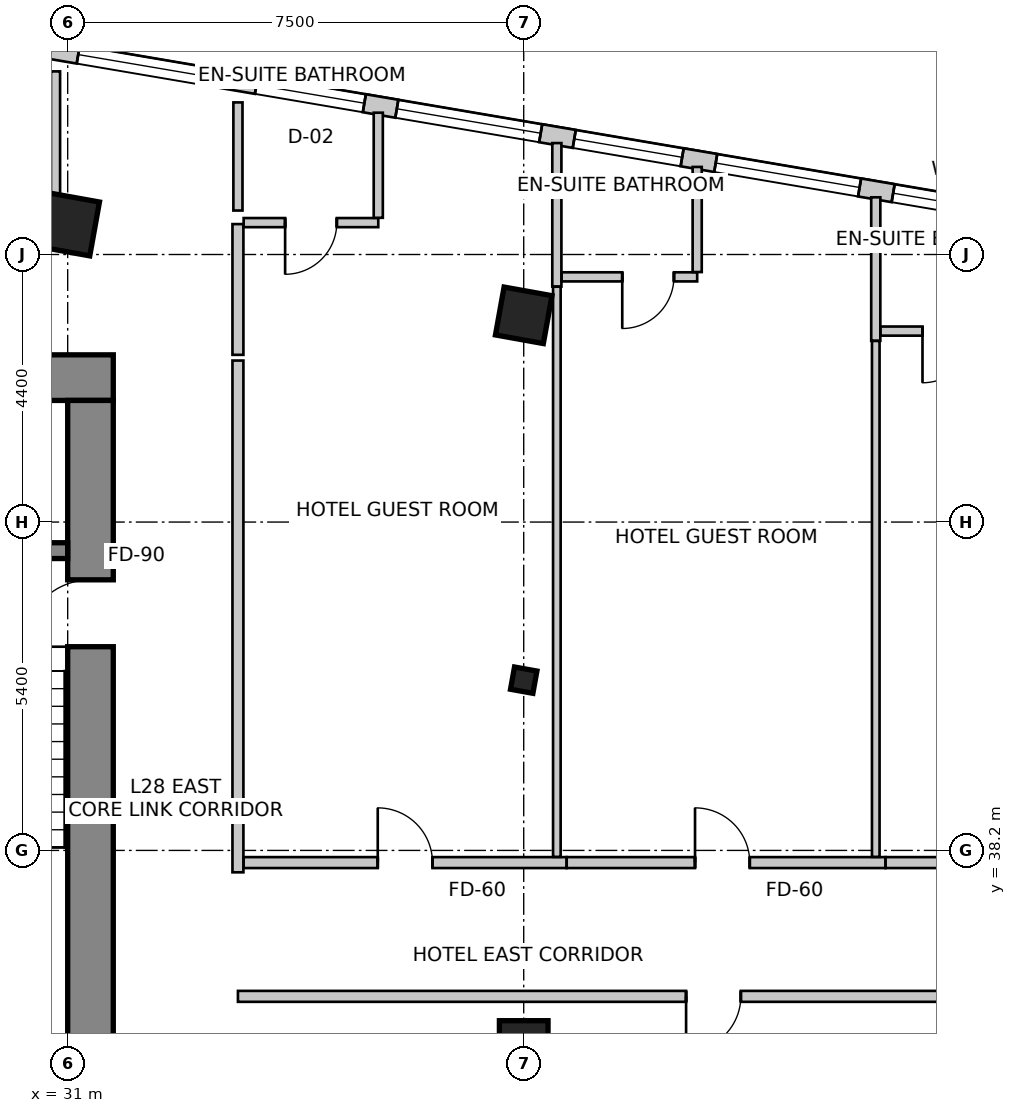
"""IFC4 building model, lengths in metres.
Left out: names, types, materials, properties, quantities, classifications, styles, units other than length and angle.
Written with IfcOpenShell. Run it as: python <this file> out.ifc"""

import sys

from ifc_helpers import new_model, si_unit, direction, frame, frame_2d, origin, origin_2d, place, context, subcontext, project, spatial, rectangle, i_section, extrude, source, transform, mapped, element, fill, save


model = new_model("IFC4")
c1 = context("Model", 3, precision=1e-05, world=origin(), true_north=direction((0.0, 1.0)))
c2 = subcontext(c1, "Body", "Model", "MODEL_VIEW")
j1 = project(units=[si_unit("LENGTHUNIT", "METRE"), si_unit("PLANEANGLEUNIT", "RADIAN")], contexts=[c1])
p1 = place(None, origin())
s1 = spatial("IfcSite", under=j1, at=p1, CompositionType="ELEMENT")
p2 = place(p1, origin())
s2 = spatial("IfcBuilding", under=s1, at=p2, CompositionType="ELEMENT")
p3 = place(p2, frame((0.0, 0.0, 117.8)))
s3 = spatial("IfcBuildingStorey", under=s2, at=p3, CompositionType="ELEMENT", Elevation=117.8)
p4 = place(p3, frame((15.85, 45.975, 0.0), z_axis=(0.0, 0.0, 1.0), x_axis=(1.0, 0.0, 0.0)))
e1 = element("IfcWall", 1, at=p4, inside=s3, PredefinedType="SHEAR", context=c2, shape_type="SweptSolid", body=[
    extrude(rectangle(XDim=15.9, YDim=0.75, at=frame_2d((7.95, 0.0))), origin(), (0.0, 0.0, 1.0), 3.6),
])
p5 = place(p3, frame((31.375, 34.2, 0.0), z_axis=(0.0, 0.0, 1.0), x_axis=(0.0, 1.0, 0.0)))
e2 = element("IfcWall", 2, at=p5, inside=s3, PredefinedType="SHEAR", context=c2, shape_type="SweptSolid", body=[
    extrude(rectangle(XDim=11.4, YDim=0.75, at=frame_2d((5.7, 0.0))), origin(), (0.0, 0.0, 1.0), 3.6),
])
m1 = source(origin(), c2, "Body", "SweptSolid", [
    extrude(rectangle(XDim=1.1, YDim=2.15, at=frame_2d((0.55, 1.075))), frame((0.0, 0.385, 0.0), z_axis=(0.0, -1.0, 0.0), x_axis=(1.0, 0.0, 0.0)), (0.0, 0.0, 1.0), 0.77),
])
p6 = place(p5, frame((7.35, 0.0, 0.0)))
e3 = element("IfcOpeningElement", 3, at=p6, cuts=e2, PredefinedType="OPENING", context=c2, shape_type="MappedRepresentation", body=[
    mapped(m1, transform((0.0, 0.0, 0.0), scale=1.0)),
])
p7 = place(p3, frame((27.5, 43.13, 0.0), z_axis=(0.0, 0.0, 1.0), x_axis=(1.0, 0.0, 0.0)))
e4 = element("IfcWall", 4, at=p7, inside=s3, PredefinedType="SHEAR", context=c2, shape_type="SweptSolid", body=[
    extrude(rectangle(XDim=3.5, YDim=0.26, at=frame_2d((1.75, 0.0))), origin(), (0.0, 0.0, 1.0), 3.6),
])
m2 = source(origin(), c2, "Body", "SweptSolid", [
    extrude(rectangle(XDim=0.9, YDim=0.9, at=origin_2d()), origin(), (0.0, 0.0, 1.0), 3.6),
])
p8 = place(p3, frame((31.0, 48.5, 0.0), z_axis=(0.0, 0.0, 1.0), x_axis=(0.984195607969, -0.17708474032, 0.0)))
e5 = element("IfcColumn", 5, at=p8, inside=s3, PredefinedType="COLUMN", context=c2, shape_type="MappedRepresentation", body=[
    mapped(m2, transform((0.0, 0.0, 0.0), scale=1.0)),
])
m3 = source(origin(), c2, "Body", "SweptSolid", [
    extrude(rectangle(XDim=0.8, YDim=0.8, at=origin_2d()), origin(), (0.0, 0.0, 1.0), 3.6),
])
for number, where, z_axis, x_axis in (
    (6, (38.5, 47.0, 0.0), (0.0, 0.0, 1.0), (0.984, -0.177, 0.0)),
    (7, (38.5, 35.0, 0.0), (0.0, 0.0, 1.0), (1.0, 0.0, 0.0)),
):
    element("IfcColumn", number, at=place(p3, frame(where, z_axis=z_axis, x_axis=x_axis)), inside=s3, PredefinedType="COLUMN", context=c2, shape_type="MappedRepresentation", body=[
        mapped(m3, transform((0.0, 0.0, 0.0), scale=1.0)),
    ])
m4 = source(origin(), c2, "Body", "SweptSolid", [
    extrude(i_section(OverallWidth=0.374, OverallDepth=0.372, WebThickness=0.016, FlangeThickness=0.026, FilletRadius=0.015, at=origin_2d()), origin(), (0.0, 0.0, 1.0), 3.6),
])
p9 = place(p3, frame((38.5, 41.0, 0.0), z_axis=(0.0, 0.0, 1.0), x_axis=(0.984195607969, -0.17708474032, 0.0)))
e8 = element("IfcColumn", 8, at=p9, inside=s3, PredefinedType="COLUMN", context=c2, shape_type="MappedRepresentation", body=[
    mapped(m4, transform((0.0, 0.0, 0.0), scale=1.0)),
])
p10 = place(p3, frame((53.561, 47.48, 0.0), z_axis=(0.0, 0.0, 1.0), x_axis=(-0.985845173895, 0.167658262868, 0.0)))
e9 = element("IfcWall", 9, at=p10, inside=s3, PredefinedType="SOLIDWALL", context=c2, shape_type="SweptSolid", body=[
    extrude(rectangle(XDim=32.132, YDim=0.3, at=frame_2d((16.066, 0.0))), origin(), (0.0, 0.0, 1.0), 3.35),
])
m5 = source(origin(), c2, "Body", "SweptSolid", [
    extrude(rectangle(XDim=2.4, YDim=2.2, at=frame_2d((1.2, 1.1))), frame((0.0, 0.16, 0.0), z_axis=(0.0, -1.0, 0.0), x_axis=(1.0, 0.0, 0.0)), (0.0, 0.0, 1.0), 0.32),
])
p11 = place(p10, frame((0.882, 0.0, 0.85)))
e10 = element("IfcOpeningElement", 10, at=p11, cuts=e9, PredefinedType="OPENING", context=c2, shape_type="MappedRepresentation", body=[
    mapped(m5, transform((0.0, 0.0, 0.0), scale=1.0)),
])
p12 = place(p10, frame((4.354, 0.0, 0.85)))
e11 = element("IfcOpeningElement", 11, at=p12, cuts=e9, PredefinedType="OPENING", context=c2, shape_type="MappedRepresentation", body=[
    mapped(m5, transform((0.0, 0.0, 0.0), scale=1.0)),
])
m6 = source(origin(), c2, "Body", "SweptSolid", [
    extrude(rectangle(XDim=1.8, YDim=2.1, at=frame_2d((0.9, 1.05))), frame((0.0, 0.16, 0.0), z_axis=(0.0, -1.0, 0.0), x_axis=(1.0, 0.0, 0.0)), (0.0, 0.0, 1.0), 0.32),
])
p13 = place(p10, frame((7.314, 0.0, 0.85)))
e12 = element("IfcOpeningElement", 12, at=p13, cuts=e9, PredefinedType="OPENING", context=c2, shape_type="MappedRepresentation", body=[
    mapped(m6, transform((0.0, 0.0, 0.0), scale=1.0)),
])
p14 = place(p10, frame((9.674, 0.0, 0.85)))
e13 = element("IfcOpeningElement", 13, at=p14, cuts=e9, PredefinedType="OPENING", context=c2, shape_type="MappedRepresentation", body=[
    mapped(m5, transform((0.0, 0.0, 0.0), scale=1.0)),
])
p15 = place(p10, frame((12.634, 0.0, 0.85)))
e14 = element("IfcOpeningElement", 14, at=p15, cuts=e9, PredefinedType="OPENING", context=c2, shape_type="MappedRepresentation", body=[
    mapped(m6, transform((0.0, 0.0, 0.0), scale=1.0)),
])
p16 = place(p10, frame((14.994, 0.0, 0.85)))
e15 = element("IfcOpeningElement", 15, at=p16, cuts=e9, PredefinedType="OPENING", context=c2, shape_type="MappedRepresentation", body=[
    mapped(m5, transform((0.0, 0.0, 0.0), scale=1.0)),
])
p17 = place(p10, frame((17.936, 0.0, 0.85)))
e16 = element("IfcOpeningElement", 16, at=p17, cuts=e9, PredefinedType="OPENING", context=c2, shape_type="MappedRepresentation", body=[
    mapped(m6, transform((0.0, 0.0, 0.0), scale=1.0)),
])
p18 = place(p10, frame((20.309, 0.0, 0.85)))
e17 = element("IfcOpeningElement", 17, at=p18, cuts=e9, PredefinedType="OPENING", context=c2, shape_type="MappedRepresentation", body=[
    mapped(m5, transform((0.0, 0.0, 0.0), scale=1.0)),
])
p19 = place(p10, frame((25.4, 0.0, 0.85)))
e18 = element("IfcOpeningElement", 18, at=p19, cuts=e9, PredefinedType="OPENING", context=c2, shape_type="MappedRepresentation", body=[
    mapped(m5, transform((0.0, 0.0, 0.0), scale=1.0)),
])
m7 = source(origin(), c2, "Body", "SweptSolid", [
    extrude(rectangle(XDim=1.2, YDim=1.6, at=frame_2d((0.6, 0.8))), frame((0.0, 0.16, 0.0), z_axis=(0.0, -1.0, 0.0), x_axis=(1.0, 0.0, 0.0)), (0.0, 0.0, 1.0), 0.32),
])
p20 = place(p10, frame((30.5, 0.0, 0.85)))
e19 = element("IfcOpeningElement", 19, at=p20, cuts=e9, PredefinedType="OPENING", context=c2, shape_type="MappedRepresentation", body=[
    mapped(m7, transform((0.0, 0.0, 0.0), scale=1.0)),
])
p21 = place(p3, frame((23.962, 48.5, 0.0), z_axis=(0.0, 0.0, 1.0), x_axis=(1.0, 0.0, 0.0)))
e20 = element("IfcWall", 20, at=p21, inside=s3, PredefinedType="PARTITIONING", context=c2, shape_type="SweptSolid", body=[
    extrude(rectangle(XDim=6.998, YDim=0.18, at=frame_2d((3.499, 0.0))), origin(), (0.0, 0.0, 1.0), 2.492),
])
m8 = source(origin(), c2, "Body", "SweptSolid", [
    extrude(rectangle(XDim=0.85, YDim=2.15, at=frame_2d((0.425, 1.075))), frame((0.0, 0.1, 0.0), z_axis=(0.0, -1.0, 0.0), x_axis=(1.0, 0.0, 0.0)), (0.0, 0.0, 1.0), 0.2),
])
p22 = place(p21, frame((3.074, 0.0, 0.0)))
e21 = element("IfcOpeningElement", 21, at=p22, cuts=e20, PredefinedType="OPENING", context=c2, shape_type="MappedRepresentation", body=[
    mapped(m8, transform((0.0, 0.0, 0.0), scale=1.0)),
])
p23 = place(p3, frame((33.8, 48.5, 0.0), z_axis=(0.0, 0.0, 1.0), x_axis=(0.0, -1.0, 0.0)))
e22 = element("IfcWall", 22, at=p23, inside=s3, PredefinedType="PARTITIONING", context=c2, shape_type="SweptSolid", body=[
    extrude(rectangle(XDim=2.15, YDim=0.18, at=frame_2d((1.075, 0.0))), origin(), (0.0, 0.0, 1.0), 2.492),
])
p24 = place(p3, frame((33.8, 46.256, 0.0), z_axis=(0.0, 0.0, 1.0), x_axis=(0.0, -1.0, 0.0)))
e23 = element("IfcWall", 23, at=p24, inside=s3, PredefinedType="PARTITIONING", context=c2, shape_type="SweptSolid", body=[
    extrude(rectangle(XDim=8.416, YDim=0.18, at=frame_2d((4.208, 0.0))), origin(), (0.0, 0.0, 1.0), 2.879),
])
p25 = place(p3, frame((33.894, 38.0, 0.0), z_axis=(0.0, 0.0, 1.0), x_axis=(1.0, 0.0, 0.0)))
e24 = element("IfcWall", 24, at=p25, inside=s3, PredefinedType="PARTITIONING", context=c2, shape_type="SweptSolid", body=[
    extrude(rectangle(XDim=5.311, YDim=0.18, at=frame_2d((2.656, 0.0))), origin(), (0.0, 0.0, 1.0), 2.803),
])
m9 = source(origin(), c2, "Body", "SweptSolid", [
    extrude(rectangle(XDim=0.9, YDim=2.15, at=frame_2d((0.45, 1.075))), frame((0.0, 0.1, 0.0), z_axis=(0.0, -1.0, 0.0), x_axis=(1.0, 0.0, 0.0)), (0.0, 0.0, 1.0), 0.2),
])
p26 = place(p25, frame((2.206, 0.0, 0.0)))
e25 = element("IfcOpeningElement", 25, at=p26, cuts=e24, PredefinedType="OPENING", context=c2, shape_type="MappedRepresentation", body=[
    mapped(m9, transform((0.0, 0.0, 0.0), scale=1.0)),
])
p27 = place(p3, frame((39.207, 38.0, 0.0), z_axis=(0.0, 0.0, 1.0), x_axis=(1.0, 0.0, 0.0)))
e26 = element("IfcWall", 26, at=p27, inside=s3, PredefinedType="PARTITIONING", context=c2, shape_type="SweptSolid", body=[
    extrude(rectangle(XDim=5.243, YDim=0.18, at=frame_2d((2.622, 0.0))), origin(), (0.0, 0.0, 1.0), 2.879),
])
p28 = place(p27, frame((2.111, 0.0, 0.0)))
e27 = element("IfcOpeningElement", 27, at=p28, cuts=e26, PredefinedType="OPENING", context=c2, shape_type="MappedRepresentation", body=[
    mapped(m9, transform((0.0, 0.0, 0.0), scale=1.0)),
])
p29 = place(p3, frame((44.452, 38.0, 0.0), z_axis=(0.0, 0.0, 1.0), x_axis=(1.0, 0.0, 0.0)))
e28 = element("IfcWall", 28, at=p29, inside=s3, PredefinedType="PARTITIONING", context=c2, shape_type="SweptSolid", body=[
    extrude(rectangle(XDim=5.083, YDim=0.18, at=frame_2d((2.542, 0.0))), origin(), (0.0, 0.0, 1.0), 2.803),
])
p30 = place(p29, frame((2.092, 0.0, 0.0)))
e29 = element("IfcOpeningElement", 29, at=p30, cuts=e28, PredefinedType="OPENING", context=c2, shape_type="MappedRepresentation", body=[
    mapped(m9, transform((0.0, 0.0, 0.0), scale=1.0)),
])
p31 = place(p3, frame((49.441, 35.8, 0.0), z_axis=(0.0, 0.0, 1.0), x_axis=(-1.0, 0.0, 0.0)))
e30 = element("IfcWall", 30, at=p31, inside=s3, PredefinedType="PARTITIONING", context=c2, shape_type="SweptSolid", body=[
    extrude(rectangle(XDim=15.641, YDim=0.18, at=frame_2d((7.82, 0.0))), origin(), (0.0, 0.0, 1.0), 2.803),
])
p32 = place(p31, frame((7.371, 0.0, 0.0)))
e31 = element("IfcOpeningElement", 31, at=p32, cuts=e30, PredefinedType="OPENING", context=c2, shape_type="MappedRepresentation", body=[
    mapped(m9, transform((0.0, 0.0, 0.0), scale=1.0)),
])
p33 = place(p3, frame((36.108, 48.524, 0.0), z_axis=(0.0, 0.0, 1.0), x_axis=(-1.0, 0.0, 0.0)))
e32 = element("IfcWall", 32, at=p33, inside=s3, PredefinedType="PARTITIONING", context=c2, shape_type="SweptSolid", body=[
    extrude(rectangle(XDim=2.214, YDim=0.15, at=frame_2d((1.107, 0.0))), origin(), (0.0, 0.0, 1.0), 3.35),
])
m10 = source(origin(), c2, "Body", "SweptSolid", [
    extrude(rectangle(XDim=0.85, YDim=2.15, at=frame_2d((0.425, 1.075))), frame((0.0, 0.085, 0.0), z_axis=(0.0, -1.0, 0.0), x_axis=(1.0, 0.0, 0.0)), (0.0, 0.0, 1.0), 0.17),
])
p34 = place(p33, frame((0.682, 0.0, 0.0)))
e33 = element("IfcOpeningElement", 33, at=p34, cuts=e32, PredefinedType="OPENING", context=c2, shape_type="MappedRepresentation", body=[
    mapped(m10, transform((0.0, 0.0, 0.0), scale=1.0)),
])
p35 = place(p3, frame((36.108, 50.332, 0.0), z_axis=(0.0, 0.0, 1.0), x_axis=(0.0, -1.0, 0.0)))
e34 = element("IfcWall", 34, at=p35, inside=s3, PredefinedType="PARTITIONING", context=c2, shape_type="SweptSolid", body=[
    extrude(rectangle(XDim=1.728, YDim=0.15, at=frame_2d((0.864, 0.0))), origin(), (0.0, 0.0, 1.0), 3.35),
])
p36 = place(p3, frame((39.045, 49.833, 0.0), z_axis=(0.0, 0.0, 1.0), x_axis=(0.0, -1.0, 0.0)))
e35 = element("IfcWall", 35, at=p36, inside=s3, PredefinedType="PARTITIONING", context=c2, shape_type="SweptSolid", body=[
    extrude(rectangle(XDim=2.36, YDim=0.15, at=frame_2d((1.18, 0.0))), origin(), (0.0, 0.0, 1.0), 3.35),
])
p37 = place(p3, frame((39.045, 47.47, 0.0), z_axis=(0.0, 0.0, 1.0), x_axis=(0.0, -1.0, 0.0)))
e36 = element("IfcWall", 36, at=p37, inside=s3, PredefinedType="PARTITIONING", context=c2, shape_type="SweptSolid", body=[
    extrude(rectangle(XDim=9.376, YDim=0.125, at=frame_2d((4.688, 0.0))), origin(), (0.0, 0.0, 1.0), 2.492),
])
p38 = place(p3, frame((41.353, 47.633, 0.0), z_axis=(0.0, 0.0, 1.0), x_axis=(-1.0, 0.0, 0.0)))
e37 = element("IfcWall", 37, at=p38, inside=s3, PredefinedType="PARTITIONING", context=c2, shape_type="SweptSolid", body=[
    extrude(rectangle(XDim=2.229, YDim=0.15, at=frame_2d((1.115, 0.0))), origin(), (0.0, 0.0, 1.0), 3.35),
])
p39 = place(p38, frame((0.382, 0.0, 0.0)))
e38 = element("IfcOpeningElement", 38, at=p39, cuts=e37, PredefinedType="OPENING", context=c2, shape_type="MappedRepresentation", body=[
    mapped(m10, transform((0.0, 0.0, 0.0), scale=1.0)),
])
p40 = place(p3, frame((41.353, 49.44, 0.0), z_axis=(0.0, 0.0, 1.0), x_axis=(0.0, -1.0, 0.0)))
e39 = element("IfcWall", 39, at=p40, inside=s3, PredefinedType="PARTITIONING", context=c2, shape_type="SweptSolid", body=[
    extrude(rectangle(XDim=1.729, YDim=0.15, at=frame_2d((0.864, 0.0))), origin(), (0.0, 0.0, 1.0), 3.35),
])
p41 = place(p3, frame((44.29, 48.94, 0.0), z_axis=(0.0, 0.0, 1.0), x_axis=(0.0, -1.0, 0.0)))
e40 = element("IfcWall", 40, at=p41, inside=s3, PredefinedType="PARTITIONING", context=c2, shape_type="SweptSolid", body=[
    extrude(rectangle(XDim=2.36, YDim=0.15, at=frame_2d((1.18, 0.0))), origin(), (0.0, 0.0, 1.0), 3.35),
])
p42 = place(p3, frame((44.29, 46.579, 0.0), z_axis=(0.0, 0.0, 1.0), x_axis=(0.0, -1.0, 0.0)))
e41 = element("IfcWall", 41, at=p42, inside=s3, PredefinedType="PARTITIONING", context=c2, shape_type="SweptSolid", body=[
    extrude(rectangle(XDim=8.485, YDim=0.125, at=frame_2d((4.242, 0.0))), origin(), (0.0, 0.0, 1.0), 2.492),
])
p43 = place(p3, frame((46.598, 46.74, 0.0), z_axis=(0.0, 0.0, 1.0), x_axis=(-1.0, 0.0, 0.0)))
e42 = element("IfcWall", 42, at=p43, inside=s3, PredefinedType="PARTITIONING", context=c2, shape_type="SweptSolid", body=[
    extrude(rectangle(XDim=2.229, YDim=0.15, at=frame_2d((1.115, 0.0))), origin(), (0.0, 0.0, 1.0), 3.35),
])
p44 = place(p43, frame((0.689, 0.0, 0.0)))
e43 = element("IfcOpeningElement", 43, at=p44, cuts=e42, PredefinedType="OPENING", context=c2, shape_type="MappedRepresentation", body=[
    mapped(m10, transform((0.0, 0.0, 0.0), scale=1.0)),
])
p45 = place(p3, frame((30.8, 51.011, 0.0), z_axis=(0.0, 0.0, 1.0), x_axis=(0.0, -1.0, 0.0)))
e44 = element("IfcWall", 44, at=p45, inside=s3, PredefinedType="PARTITIONING", context=c2, shape_type="SweptSolid", body=[
    extrude(rectangle(XDim=2.292, YDim=0.15, at=frame_2d((1.146, 0.0))), origin(), (0.0, 0.0, 1.0), 3.35),
])
p46 = place(p3, frame((33.8, 48.723, 0.0), z_axis=(0.0, 0.0, 1.0), x_axis=(0.0, 1.0, 0.0)))
e45 = element("IfcWall", 45, at=p46, inside=s3, PredefinedType="PARTITIONING", context=c2, shape_type="SweptSolid", body=[
    extrude(rectangle(XDim=1.778, YDim=0.15, at=frame_2d((0.889, 0.0))), origin(), (0.0, 0.0, 1.0), 3.35),
])
m11 = source(origin(), c2, "Body", "SweptSolid", [
    extrude(rectangle(XDim=1.8, YDim=2.1, at=frame_2d((0.9, 1.05))), frame((0.0, -0.015, 0.0), z_axis=(0.0, -1.0, 0.0), x_axis=(1.0, 0.0, 0.0)), (0.0, 0.0, 1.0), 0.06),
])
p47 = place(p13, origin())
e46 = element("IfcWindow", 46, at=p47, inside=s3, PartitioningType="SINGLE_PANEL", PredefinedType="WINDOW", context=c2, shape_type="MappedRepresentation", body=[
    mapped(m11, transform((0.0, 0.0, 0.0), scale=1.0)),
])
fill(e12, e46)
m12 = source(origin(), c2, "Body", "SweptSolid", [
    extrude(rectangle(XDim=2.4, YDim=2.2, at=frame_2d((1.2, 1.1))), frame((0.0, -0.015, 0.0), z_axis=(0.0, -1.0, 0.0), x_axis=(1.0, 0.0, 0.0)), (0.0, 0.0, 1.0), 0.06),
])
p48 = place(p14, origin())
e47 = element("IfcWindow", 47, at=p48, inside=s3, PartitioningType="SINGLE_PANEL", PredefinedType="WINDOW", context=c2, shape_type="MappedRepresentation", body=[
    mapped(m12, transform((0.0, 0.0, 0.0), scale=1.0)),
])
fill(e13, e47)
p49 = place(p15, origin())
e48 = element("IfcWindow", 48, at=p49, inside=s3, PartitioningType="SINGLE_PANEL", PredefinedType="WINDOW", context=c2, shape_type="MappedRepresentation", body=[
    mapped(m11, transform((0.0, 0.0, 0.0), scale=1.0)),
])
fill(e14, e48)
p50 = place(p16, origin())
e49 = element("IfcWindow", 49, at=p50, inside=s3, PartitioningType="SINGLE_PANEL", PredefinedType="WINDOW", context=c2, shape_type="MappedRepresentation", body=[
    mapped(m12, transform((0.0, 0.0, 0.0), scale=1.0)),
])
fill(e15, e49)
p51 = place(p17, origin())
e50 = element("IfcWindow", 50, at=p51, inside=s3, PartitioningType="SINGLE_PANEL", PredefinedType="WINDOW", context=c2, shape_type="MappedRepresentation", body=[
    mapped(m11, transform((0.0, 0.0, 0.0), scale=1.0)),
])
fill(e16, e50)
p52 = place(p18, origin())
e51 = element("IfcWindow", 51, at=p52, inside=s3, PartitioningType="SINGLE_PANEL", PredefinedType="WINDOW", context=c2, shape_type="MappedRepresentation", body=[
    mapped(m12, transform((0.0, 0.0, 0.0), scale=1.0)),
])
fill(e17, e51)
m13 = source(origin(), c2, "Body", "SweptSolid", [
    extrude(rectangle(XDim=1.1, YDim=2.15, at=frame_2d((0.55, 1.075))), frame((0.0, 0.025, 0.0), z_axis=(0.0, -1.0, 0.0), x_axis=(1.0, 0.0, 0.0)), (0.0, 0.0, 1.0), 0.05),
])
p53 = place(p6, origin())
e52 = element("IfcDoor", 52, at=p53, inside=s3, OperationType="SINGLE_SWING_LEFT", PredefinedType="DOOR", context=c2, shape_type="MappedRepresentation", body=[
    mapped(m13, transform((0.0, 0.0, 0.0), scale=1.0)),
])
fill(e3, e52)
m14 = source(origin(), c2, "Body", "SweptSolid", [
    extrude(rectangle(XDim=0.85, YDim=2.15, at=frame_2d((0.425, 1.075))), frame((0.0, 0.025, 0.0), z_axis=(0.0, -1.0, 0.0), x_axis=(1.0, 0.0, 0.0)), (0.0, 0.0, 1.0), 0.05),
])
p54 = place(p34, origin())
e53 = element("IfcDoor", 53, at=p54, inside=s3, OperationType="SINGLE_SWING_RIGHT", PredefinedType="DOOR", context=c2, shape_type="MappedRepresentation", body=[
    mapped(m14, transform((0.0, 0.0, 0.0), scale=1.0)),
])
fill(e33, e53)
m15 = source(origin(), c2, "Body", "SweptSolid", [
    extrude(rectangle(XDim=0.9, YDim=2.15, at=frame_2d((0.45, 1.075))), frame((0.0, 0.025, 0.0), z_axis=(0.0, -1.0, 0.0), x_axis=(1.0, 0.0, 0.0)), (0.0, 0.0, 1.0), 0.05),
])
p55 = place(p26, origin())
e54 = element("IfcDoor", 54, at=p55, inside=s3, OperationType="SINGLE_SWING_LEFT", PredefinedType="DOOR", context=c2, shape_type="MappedRepresentation", body=[
    mapped(m15, transform((0.0, 0.0, 0.0), scale=1.0)),
])
fill(e25, e54)
p56 = place(p39, origin())
e55 = element("IfcDoor", 55, at=p56, inside=s3, OperationType="SINGLE_SWING_RIGHT", PredefinedType="DOOR", context=c2, shape_type="MappedRepresentation", body=[
    mapped(m14, transform((0.0, 0.0, 0.0), scale=1.0)),
])
fill(e38, e55)
p57 = place(p28, origin())
e56 = element("IfcDoor", 56, at=p57, inside=s3, OperationType="SINGLE_SWING_LEFT", PredefinedType="DOOR", context=c2, shape_type="MappedRepresentation", body=[
    mapped(m15, transform((0.0, 0.0, 0.0), scale=1.0)),
])
fill(e27, e56)
p58 = place(p44, origin())
e57 = element("IfcDoor", 57, at=p58, inside=s3, OperationType="SINGLE_SWING_RIGHT", PredefinedType="DOOR", context=c2, shape_type="MappedRepresentation", body=[
    mapped(m14, transform((0.0, 0.0, 0.0), scale=1.0)),
])
fill(e43, e57)
m16 = source(origin(), c2, "Body", "SweptSolid", [
    extrude(rectangle(XDim=0.9, YDim=2.15, at=frame_2d((0.45, 1.075))), frame((0.0, 0.025, 0.0), z_axis=(0.0, -1.0, 0.0), x_axis=(1.0, 0.0, 0.0)), (0.0, 0.0, 1.0), 0.05),
])
p59 = place(p32, origin())
e58 = element("IfcDoor", 58, at=p59, inside=s3, OperationType="SINGLE_SWING_RIGHT", PredefinedType="DOOR", context=c2, shape_type="MappedRepresentation", body=[
    mapped(m16, transform((0.0, 0.0, 0.0), scale=1.0)),
])
fill(e31, e58)
save(model, sys.argv[1])
